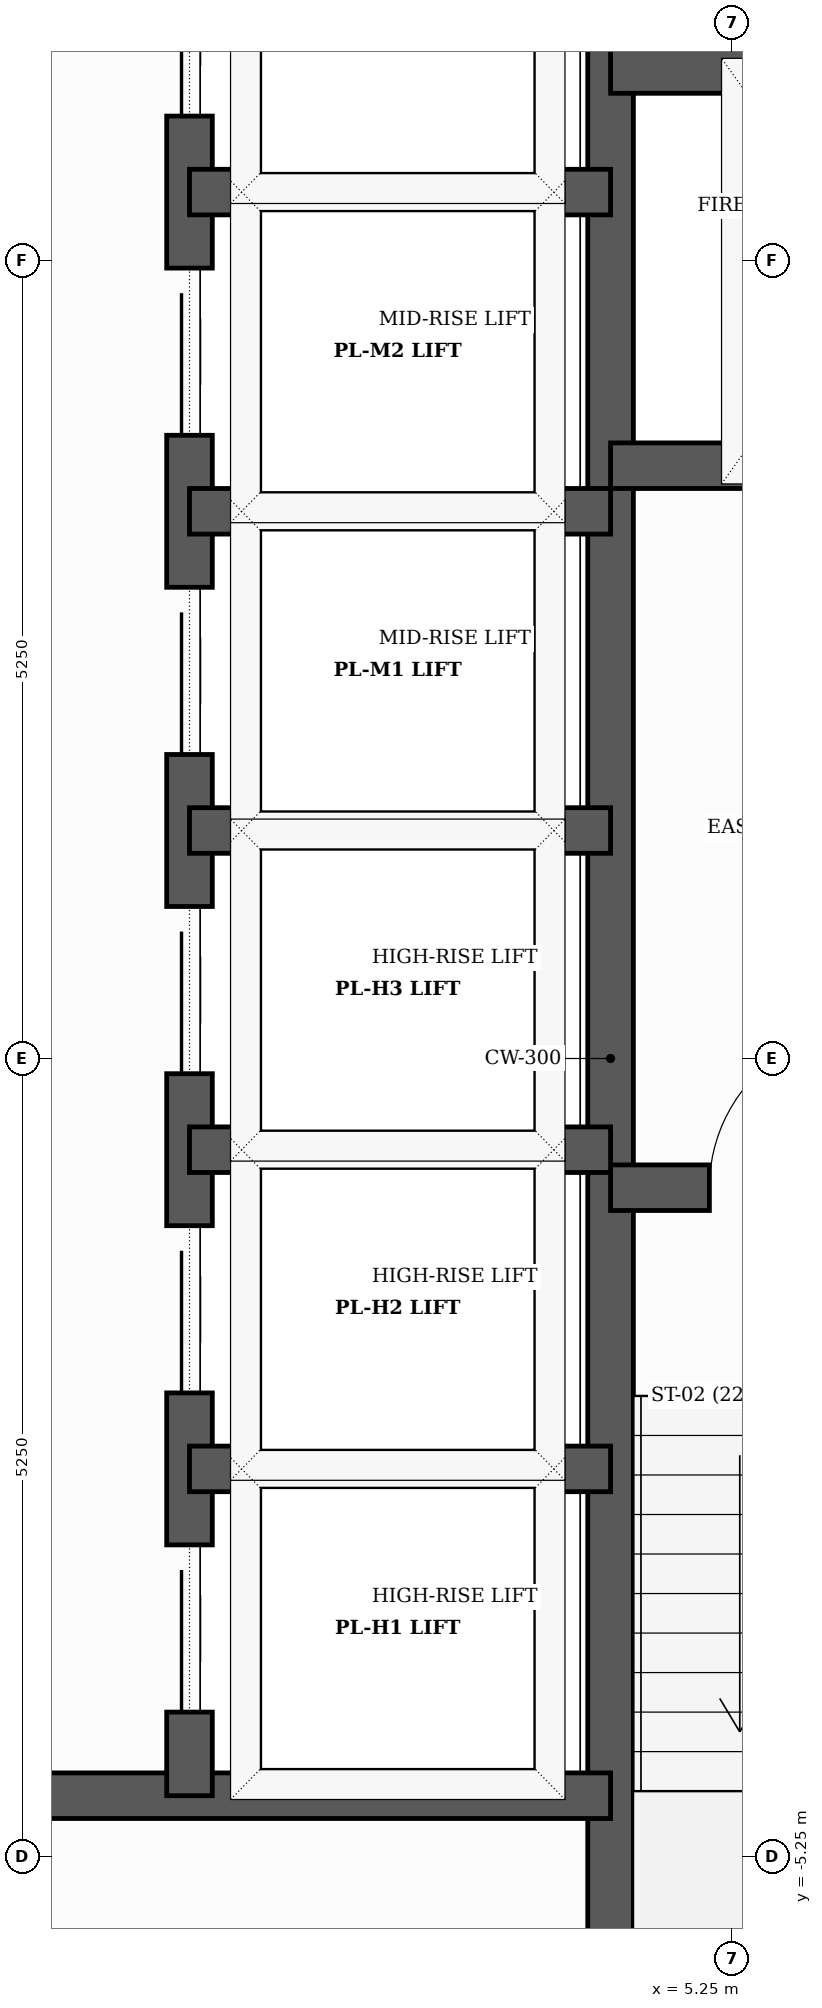
"""IFC4 building model, lengths in metres.
Left out: names, types, materials, properties, quantities, classifications, styles, units other than length and angle.
Written with IfcOpenShell. Run it as: python <this file> out.ifc"""

import sys

from ifc_helpers import new_model, si_unit, direction, frame, frame_2d, origin, place, context, subcontext, project, spatial, rectangle, extrude, element, fill, save


model = new_model("IFC4")
c1 = context("Model", 3, precision=1e-05, world=origin(), true_north=direction((0.0, 1.0)))
c2 = subcontext(c1, "Body", "Model", "MODEL_VIEW")
j1 = project(units=[si_unit("LENGTHUNIT", "METRE"), si_unit("PLANEANGLEUNIT", "RADIAN")], contexts=[c1])
p1 = place(None, origin())
s1 = spatial("IfcSite", under=j1, at=p1, CompositionType="ELEMENT")
p2 = place(p1, origin())
s2 = spatial("IfcBuilding", under=s1, at=p2, CompositionType="ELEMENT")
p3 = place(p2, frame((0.0, 0.0, 90.3)))
s3 = spatial("IfcBuildingStorey", under=s2, at=p3, CompositionType="ELEMENT", Elevation=90.3)
p4 = place(p3, frame((4.45, -7.79, 0.0), z_axis=(0.0, 0.0, 1.0), x_axis=(0.0, 1.0, 0.0)))
e1 = element("IfcWall", 1, at=p4, inside=s3, PredefinedType="SHEAR", context=c2, shape_type="SweptSolid", body=[
    extrude(rectangle(XDim=15.58, YDim=0.3, at=frame_2d((7.79, 0.0))), origin(), (0.0, 0.0, 1.0), 3.5),
])
p5 = place(p3, frame((4.45, -0.85, 0.0), z_axis=(0.0, 0.0, 1.0), x_axis=(1.0, 0.0, 0.0)))
e2 = element("IfcWall", 2, at=p5, inside=s3, PredefinedType="SHEAR", context=c2, shape_type="SweptSolid", body=[
    extrude(rectangle(XDim=3.34, YDim=0.3, at=frame_2d((1.67, 0.0))), origin(), (0.0, 0.0, 1.0), 3.5),
])
p6 = place(p5, frame((0.65, 0.0, 0.0)))
e3 = element("IfcOpeningElement", 3, at=p6, cuts=e2, PredefinedType="OPENING", context=c2, shape_type="SweptSolid", body=[
    extrude(rectangle(XDim=1.05, YDim=2.15, at=frame_2d((0.525, 1.075))), frame((0.0, 0.16, 0.0), z_axis=(0.0, -1.0, 0.0), x_axis=(1.0, 0.0, 0.0)), (0.0, 0.0, 1.0), 0.32),
])
p7 = place(p3, frame((4.45, 3.9, 0.0), z_axis=(0.0, 0.0, 1.0), x_axis=(1.0, 0.0, 0.0)))
e4 = element("IfcWall", 4, at=p7, inside=s3, PredefinedType="SHEAR", context=c2, shape_type="SweptSolid", body=[
    extrude(rectangle(XDim=3.34, YDim=0.3, at=frame_2d((1.67, 0.0))), origin(), (0.0, 0.0, 1.0), 3.5),
])
p8 = place(p7, frame((1.18, 0.0, 0.0)))
e5 = element("IfcOpeningElement", 5, at=p8, cuts=e4, PredefinedType="OPENING", context=c2, shape_type="SweptSolid", body=[
    extrude(rectangle(XDim=1.1, YDim=2.1, at=frame_2d((0.55, 1.05))), frame((0.0, 0.16, 0.0), z_axis=(0.0, -1.0, 0.0), x_axis=(1.0, 0.0, 0.0)), (0.0, 0.0, 1.0), 0.32),
])
p9 = place(p3, frame((4.45, 6.5, 0.0), z_axis=(0.0, 0.0, 1.0), x_axis=(1.0, 0.0, 0.0)))
e6 = element("IfcWall", 6, at=p9, inside=s3, PredefinedType="SHEAR", context=c2, shape_type="SweptSolid", body=[
    extrude(rectangle(XDim=3.34, YDim=0.3, at=frame_2d((1.67, 0.0))), origin(), (0.0, 0.0, 1.0), 3.5),
])
p10 = place(p3, frame((-4.45, -4.85, 0.0), z_axis=(0.0, 0.0, 1.0), x_axis=(1.0, 0.0, 0.0)))
e7 = element("IfcWall", 7, at=p10, inside=s3, PredefinedType="SHEAR", context=c2, shape_type="SweptSolid", body=[
    extrude(rectangle(XDim=8.9, YDim=0.3, at=frame_2d((4.45, 0.0))), origin(), (0.0, 0.0, 1.0), 3.5),
])
p11 = place(p3, frame((1.68, -4.85, 0.0), z_axis=(0.0, 0.0, 1.0), x_axis=(0.0, 1.0, 0.0)))
e8 = element("IfcWall", 8, at=p11, inside=s3, PredefinedType="SHEAR", context=c2, shape_type="SweptSolid", body=[
    extrude(rectangle(XDim=12.64, YDim=0.3, at=frame_2d((6.32, 0.0))), origin(), (0.0, 0.0, 1.0), 3.5),
])
p12 = place(p11, frame((0.55, 0.0, 0.0)))
e9 = element("IfcOpeningElement", 9, at=p12, cuts=e8, PredefinedType="OPENING", context=c2, shape_type="SweptSolid", body=[
    extrude(rectangle(XDim=1.1, YDim=2.1, at=frame_2d((0.55, 1.05))), frame((0.0, 0.16, 0.0), z_axis=(0.0, -1.0, 0.0), x_axis=(1.0, 0.0, 0.0)), (0.0, 0.0, 1.0), 0.32),
])
p13 = place(p11, frame((2.65, 0.0, 0.0)))
e10 = element("IfcOpeningElement", 10, at=p13, cuts=e8, PredefinedType="OPENING", context=c2, shape_type="SweptSolid", body=[
    extrude(rectangle(XDim=1.1, YDim=2.1, at=frame_2d((0.55, 1.05))), frame((0.0, 0.16, 0.0), z_axis=(0.0, -1.0, 0.0), x_axis=(1.0, 0.0, 0.0)), (0.0, 0.0, 1.0), 0.32),
])
p14 = place(p11, frame((4.75, 0.0, 0.0)))
e11 = element("IfcOpeningElement", 11, at=p14, cuts=e8, PredefinedType="OPENING", context=c2, shape_type="SweptSolid", body=[
    extrude(rectangle(XDim=1.1, YDim=2.1, at=frame_2d((0.55, 1.05))), frame((0.0, 0.16, 0.0), z_axis=(0.0, -1.0, 0.0), x_axis=(1.0, 0.0, 0.0)), (0.0, 0.0, 1.0), 0.32),
])
p15 = place(p11, frame((6.85, 0.0, 0.0)))
e12 = element("IfcOpeningElement", 12, at=p15, cuts=e8, PredefinedType="OPENING", context=c2, shape_type="SweptSolid", body=[
    extrude(rectangle(XDim=1.1, YDim=2.1, at=frame_2d((0.55, 1.05))), frame((0.0, 0.16, 0.0), z_axis=(0.0, -1.0, 0.0), x_axis=(1.0, 0.0, 0.0)), (0.0, 0.0, 1.0), 0.32),
])
p16 = place(p11, frame((8.95, 0.0, 0.0)))
e13 = element("IfcOpeningElement", 13, at=p16, cuts=e8, PredefinedType="OPENING", context=c2, shape_type="SweptSolid", body=[
    extrude(rectangle(XDim=1.1, YDim=2.1, at=frame_2d((0.55, 1.05))), frame((0.0, 0.16, 0.0), z_axis=(0.0, -1.0, 0.0), x_axis=(1.0, 0.0, 0.0)), (0.0, 0.0, 1.0), 0.32),
])
p17 = place(p11, frame((11.05, 0.0, 0.0)))
e14 = element("IfcOpeningElement", 14, at=p17, cuts=e8, PredefinedType="OPENING", context=c2, shape_type="SweptSolid", body=[
    extrude(rectangle(XDim=1.1, YDim=2.1, at=frame_2d((0.55, 1.05))), frame((0.0, 0.16, 0.0), z_axis=(0.0, -1.0, 0.0), x_axis=(1.0, 0.0, 0.0)), (0.0, 0.0, 1.0), 0.32),
])
for number, where, z_axis, x_axis in (
    (15, (1.68, 1.5, 0.0), (0.0, 0.0, 1.0), (1.0, 0.0, 0.0)),
    (16, (1.68, 3.6, 0.0), (0.0, 0.0, 1.0), (1.0, 0.0, 0.0)),
    (17, (1.68, 5.7, 0.0), (0.0, 0.0, 1.0), (1.0, 0.0, 0.0)),
    (18, (1.68, -2.7, 0.0), (0.0, 0.0, 1.0), (1.0, 0.0, 0.0)),
    (19, (1.68, -0.6, 0.0), (0.0, 0.0, 1.0), (1.0, 0.0, 0.0)),
):
    element("IfcWall", number, at=place(p3, frame(where, z_axis=z_axis, x_axis=x_axis)), inside=s3, PredefinedType="SHEAR", context=c2, shape_type="SweptSolid", body=[
        extrude(rectangle(XDim=2.77, YDim=0.3, at=frame_2d((1.385, 0.0))), origin(), (0.0, 0.0, 1.0), 3.5),
    ])
p18 = place(p6, origin())
e20 = element("IfcDoor", 20, at=p18, inside=s3, OperationType="SINGLE_SWING_RIGHT", PredefinedType="DOOR", context=c2, shape_type="SweptSolid", body=[
    extrude(rectangle(XDim=1.05, YDim=2.15, at=frame_2d((0.525, 1.075))), frame((0.0, 0.025, 0.0), z_axis=(0.0, -1.0, 0.0), x_axis=(1.0, 0.0, 0.0)), (0.0, 0.0, 1.0), 0.05),
])
fill(e3, e20)
p19 = place(p12, origin())
e21 = element("IfcDoor", 21, at=p19, inside=s3, OperationType="SLIDING_TO_LEFT", PredefinedType="DOOR", context=c2, shape_type="SweptSolid", body=[
    extrude(rectangle(XDim=1.1, YDim=2.1, at=frame_2d((0.55, 1.05))), frame((0.0, 0.025, 0.0), z_axis=(0.0, -1.0, 0.0), x_axis=(1.0, 0.0, 0.0)), (0.0, 0.0, 1.0), 0.05),
])
fill(e9, e21)
p20 = place(p13, origin())
e22 = element("IfcDoor", 22, at=p20, inside=s3, OperationType="SLIDING_TO_LEFT", PredefinedType="DOOR", context=c2, shape_type="SweptSolid", body=[
    extrude(rectangle(XDim=1.1, YDim=2.1, at=frame_2d((0.55, 1.05))), frame((0.0, 0.025, 0.0), z_axis=(0.0, -1.0, 0.0), x_axis=(1.0, 0.0, 0.0)), (0.0, 0.0, 1.0), 0.05),
])
fill(e10, e22)
p21 = place(p14, origin())
e23 = element("IfcDoor", 23, at=p21, inside=s3, OperationType="SLIDING_TO_LEFT", PredefinedType="DOOR", context=c2, shape_type="SweptSolid", body=[
    extrude(rectangle(XDim=1.1, YDim=2.1, at=frame_2d((0.55, 1.05))), frame((0.0, 0.025, 0.0), z_axis=(0.0, -1.0, 0.0), x_axis=(1.0, 0.0, 0.0)), (0.0, 0.0, 1.0), 0.05),
])
fill(e11, e23)
p22 = place(p15, origin())
e24 = element("IfcDoor", 24, at=p22, inside=s3, OperationType="SLIDING_TO_LEFT", PredefinedType="DOOR", context=c2, shape_type="SweptSolid", body=[
    extrude(rectangle(XDim=1.1, YDim=2.1, at=frame_2d((0.55, 1.05))), frame((0.0, 0.025, 0.0), z_axis=(0.0, -1.0, 0.0), x_axis=(1.0, 0.0, 0.0)), (0.0, 0.0, 1.0), 0.05),
])
fill(e12, e24)
p23 = place(p16, origin())
e25 = element("IfcDoor", 25, at=p23, inside=s3, OperationType="SLIDING_TO_LEFT", PredefinedType="DOOR", context=c2, shape_type="SweptSolid", body=[
    extrude(rectangle(XDim=1.1, YDim=2.1, at=frame_2d((0.55, 1.05))), frame((0.0, 0.025, 0.0), z_axis=(0.0, -1.0, 0.0), x_axis=(1.0, 0.0, 0.0)), (0.0, 0.0, 1.0), 0.05),
])
fill(e13, e25)
p24 = place(p17, origin())
e26 = element("IfcDoor", 26, at=p24, inside=s3, OperationType="SLIDING_TO_LEFT", PredefinedType="DOOR", context=c2, shape_type="SweptSolid", body=[
    extrude(rectangle(XDim=1.1, YDim=2.1, at=frame_2d((0.55, 1.05))), frame((0.0, 0.025, 0.0), z_axis=(0.0, -1.0, 0.0), x_axis=(1.0, 0.0, 0.0)), (0.0, 0.0, 1.0), 0.05),
])
fill(e14, e26)
save(model, sys.argv[1])
